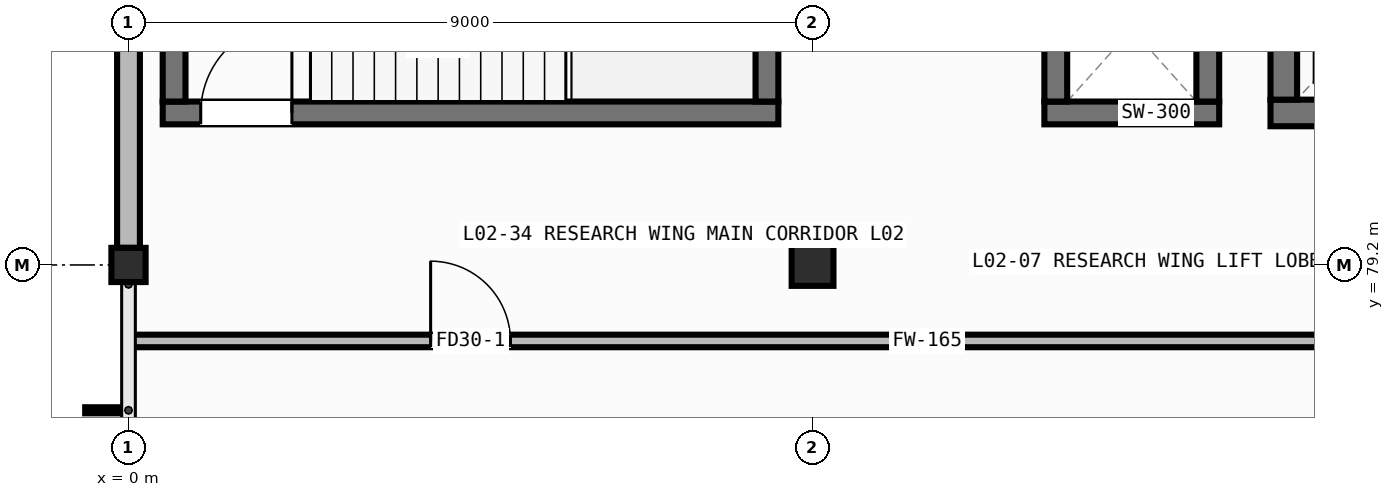
"""IFC4 building model, lengths in metres.
Left out: names, types, materials, properties, quantities, classifications, styles, units other than length and angle.
Written with IfcOpenShell. Run it as: python <this file> out.ifc"""

import sys

from ifc_helpers import new_model, si_unit, direction, frame, frame_2d, origin, origin_2d, place, context, subcontext, project, spatial, rectangle, hollow_rectangle, extrude, element, fill, save


model = new_model("IFC4")
c1 = context("Model", 3, precision=1e-05, world=origin(), true_north=direction((0.0, 1.0)))
c2 = subcontext(c1, "Body", "Model", "MODEL_VIEW")
j1 = project(units=[si_unit("LENGTHUNIT", "METRE"), si_unit("PLANEANGLEUNIT", "RADIAN")], contexts=[c1])
p1 = place(None, origin())
s1 = spatial("IfcSite", under=j1, at=p1, CompositionType="ELEMENT")
p2 = place(p1, origin())
s2 = spatial("IfcBuilding", under=s1, at=p2, CompositionType="ELEMENT")
p3 = place(p2, frame((0.0, 0.0, 4.8)))
s3 = spatial("IfcBuildingStorey", under=s2, at=p3, CompositionType="ELEMENT", Elevation=4.8)
p4 = place(p3, frame((0.0, 79.2, 0.0), z_axis=(0.0, 0.0, 1.0), x_axis=(1.0, 0.0, 0.0)))
e1 = element("IfcColumn", 1, at=p4, inside=s3, PredefinedType="COLUMN", context=c2, shape_type="SweptSolid", body=[
    extrude(hollow_rectangle(XDim=0.45, YDim=0.45, WallThickness=0.019, at=origin_2d()), origin(), (0.0, 0.0, 1.0), 4.0),
])
p5 = place(p3, frame((9.0, 79.2, 0.0), z_axis=(0.0, 0.0, 1.0), x_axis=(1.0, 0.0, 0.0)))
e2 = element("IfcColumn", 2, at=p5, inside=s3, PredefinedType="COLUMN", context=c2, shape_type="SweptSolid", body=[
    extrude(hollow_rectangle(XDim=0.55, YDim=0.55, WallThickness=0.022, at=origin_2d()), origin(), (0.0, 0.0, 1.0), 4.0),
])
p6 = place(p3, frame((0.0, 79.425, 0.0), z_axis=(0.0, 0.0, 1.0), x_axis=(0.0, 1.0, 0.0)))
e3 = element("IfcWall", 3, at=p6, inside=s3, PredefinedType="STANDARD", context=c2, shape_type="SweptSolid", body=[
    extrude(rectangle(XDim=6.75, YDim=0.3, at=frame_2d((3.375, 0.0))), origin(), (0.0, 0.0, 1.0), 3.255),
])
p7 = place(p3, frame((0.45, 81.2, 0.0), z_axis=(0.0, 0.0, 1.0), x_axis=(1.0, 0.0, 0.0)))
e4 = element("IfcWall", 4, at=p7, inside=s3, PredefinedType="SHEAR", context=c2, shape_type="SweptSolid", body=[
    extrude(rectangle(XDim=8.1, YDim=0.3, at=frame_2d((4.05, 0.0))), origin(), (0.0, 0.0, 1.0), 3.755),
])
p8 = place(p7, frame((0.5, 0.0, 0.0)))
e5 = element("IfcOpeningElement", 5, at=p8, cuts=e4, PredefinedType="OPENING", context=c2, shape_type="SweptSolid", body=[
    extrude(rectangle(XDim=1.2, YDim=2.1, at=frame_2d((0.6, 1.05))), frame((0.0, 0.162, 0.0), z_axis=(0.0, -1.0, 0.0), x_axis=(1.0, 0.0, 0.0)), (0.0, 0.0, 1.0), 0.324),
])
for number, where, z_axis, x_axis in (
    (6, (0.6, 81.35, 0.0), (0.0, 0.0, 1.0), (0.0, 1.0, 0.0)),
    (7, (8.4, 81.35, 0.0), (0.0, 0.0, 1.0), (0.0, 1.0, 0.0)),
):
    element("IfcWall", number, at=place(p3, frame(where, z_axis=z_axis, x_axis=x_axis)), inside=s3, PredefinedType="SHEAR", context=c2, shape_type="SweptSolid", body=[
        extrude(rectangle(XDim=3.8, YDim=0.3, at=frame_2d((1.9, 0.0))), origin(), (0.0, 0.0, 1.0), 3.755),
    ])
p9 = place(p3, frame((15.025, 81.2, 0.0), z_axis=(0.0, 0.0, 1.0), x_axis=(1.0, 0.0, 0.0)))
e8 = element("IfcWall", 8, at=p9, inside=s3, PredefinedType="SHEAR", context=c2, shape_type="SweptSolid", body=[
    extrude(rectangle(XDim=2.75, YDim=0.35, at=frame_2d((1.375, 0.0))), origin(), (0.0, 0.0, 1.0), 3.755),
])
p10 = place(p9, frame((0.825, 0.0, 0.0)))
e9 = element("IfcOpeningElement", 9, at=p10, cuts=e8, PredefinedType="OPENING", context=c2, shape_type="SweptSolid", body=[
    extrude(rectangle(XDim=1.1, YDim=2.1, at=frame_2d((0.55, 1.05))), frame((0.0, 0.187, 0.0), z_axis=(0.0, -1.0, 0.0), x_axis=(1.0, 0.0, 0.0)), (0.0, 0.0, 1.0), 0.374),
])
p11 = place(p3, frame((15.2, 81.375, 0.0), z_axis=(0.0, 0.0, 1.0), x_axis=(0.0, 1.0, 0.0)))
e10 = element("IfcWall", 10, at=p11, inside=s3, PredefinedType="SHEAR", context=c2, shape_type="SweptSolid", body=[
    extrude(rectangle(XDim=2.25, YDim=0.35, at=frame_2d((1.125, 0.0))), origin(), (0.0, 0.0, 1.0), 3.755),
])
p12 = place(p3, frame((12.05, 81.2, 0.0), z_axis=(0.0, 0.0, 1.0), x_axis=(1.0, 0.0, 0.0)))
e11 = element("IfcWall", 11, at=p12, inside=s3, PredefinedType="SHEAR", context=c2, shape_type="SweptSolid", body=[
    extrude(rectangle(XDim=2.3, YDim=0.3, at=frame_2d((1.15, 0.0))), origin(), (0.0, 0.0, 1.0), 3.755),
])
for number, where, z_axis, x_axis in (
    (12, (12.2, 81.35, 0.0), (0.0, 0.0, 1.0), (0.0, 1.0, 0.0)),
    (13, (14.2, 81.35, 0.0), (0.0, 0.0, 1.0), (0.0, 1.0, 0.0)),
):
    element("IfcWall", number, at=place(p3, frame(where, z_axis=z_axis, x_axis=x_axis)), inside=s3, PredefinedType="SHEAR", context=c2, shape_type="SweptSolid", body=[
        extrude(rectangle(XDim=1.9, YDim=0.3, at=frame_2d((0.95, 0.0))), origin(), (0.0, 0.0, 1.0), 3.755),
    ])
p13 = place(p3, frame((0.035, 78.2, 0.0), z_axis=(0.0, 0.0, 1.0), x_axis=(1.0, 0.0, 0.0)))
e14 = element("IfcWall", 14, at=p13, inside=s3, PredefinedType="PARTITIONING", context=c2, shape_type="SweptSolid", body=[
    extrude(rectangle(XDim=16.365, YDim=0.165, at=frame_2d((8.183, 0.0))), origin(), (0.0, 0.0, 1.0), 3.755),
])
p14 = place(p13, frame((3.94, 0.0, 0.0)))
e15 = element("IfcOpeningElement", 15, at=p14, cuts=e14, PredefinedType="OPENING", context=c2, shape_type="SweptSolid", body=[
    extrude(rectangle(XDim=1.05, YDim=2.1, at=frame_2d((0.525, 1.05))), frame((0.0, 0.094, 0.0), z_axis=(0.0, -1.0, 0.0), x_axis=(1.0, 0.0, 0.0)), (0.0, 0.0, 1.0), 0.189),
])
p15 = place(p8, origin())
e16 = element("IfcDoor", 16, at=p15, inside=s3, OperationType="SINGLE_SWING_RIGHT", PredefinedType="DOOR", context=c2, shape_type="SweptSolid", body=[
    extrude(rectangle(XDim=1.2, YDim=2.1, at=frame_2d((0.6, 1.05))), frame((0.0, 0.025, 0.0), z_axis=(0.0, -1.0, 0.0), x_axis=(1.0, 0.0, 0.0)), (0.0, 0.0, 1.0), 0.05),
])
fill(e5, e16)
p16 = place(p14, origin())
e17 = element("IfcDoor", 17, at=p16, inside=s3, OperationType="SINGLE_SWING_LEFT", PredefinedType="DOOR", context=c2, shape_type="SweptSolid", body=[
    extrude(rectangle(XDim=1.05, YDim=2.1, at=frame_2d((0.525, 1.05))), frame((0.0, 0.025, 0.0), z_axis=(0.0, -1.0, 0.0), x_axis=(1.0, 0.0, 0.0)), (0.0, 0.0, 1.0), 0.05),
])
fill(e15, e17)
save(model, sys.argv[1])
